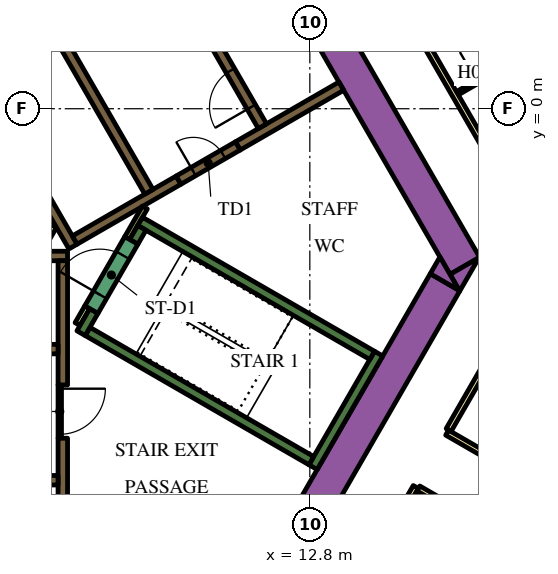
"""IFC4 building model, lengths in metres.
Left out: names, types, materials, properties, quantities, classifications, styles, units other than length and angle.
Written with IfcOpenShell. Run it as: python <this file> out.ifc"""

import sys

from ifc_helpers import new_model, si_unit, direction, frame, frame_2d, origin, place, context, subcontext, project, spatial, polyline, rectangle, outline, extrude, element, fill, save


model = new_model("IFC4")
c1 = context("Model", 3, precision=1e-05, world=origin(), true_north=direction((0.0, 1.0)))
c2 = subcontext(c1, "Body", "Model", "MODEL_VIEW")
j1 = project(units=[si_unit("LENGTHUNIT", "METRE"), si_unit("PLANEANGLEUNIT", "RADIAN")], contexts=[c1])
p1 = place(None, origin())
s1 = spatial("IfcSite", under=j1, at=p1, CompositionType="ELEMENT")
p2 = place(p1, origin())
s2 = spatial("IfcBuilding", under=s1, at=p2, CompositionType="ELEMENT")
p3 = place(p2, frame((0.0, 0.0, 103.2)))
s3 = spatial("IfcBuildingStorey", under=s2, at=p3, CompositionType="ELEMENT", Elevation=103.2)
p4 = place(p3, frame((6.711, 13.476, 0.0), z_axis=(0.0, 0.0, 1.0), x_axis=(0.500002723396, -0.866023831425, 0.0)))
e1 = element("IfcWall", 1, at=p4, inside=s3, PredefinedType="SOLIDWALL", context=c2, shape_type="SweptSolid", body=[
    extrude(rectangle(XDim=20.334, YDim=0.9, at=frame_2d((10.167, 0.0))), origin(), (0.0, 0.0, 1.0), 3.9),
])
p5 = place(p3, origin())
e2 = element("IfcWall", 2, at=p5, inside=s3, PredefinedType="SOLIDWALL", context=c2, shape_type="SweptSolid", body=[
    extrude(outline(polyline([(16.743, -4.8), (16.489, -4.36), (17.251, -3.92), (16.743, -4.8)])), origin(), (0.0, 0.0, 1.0), 3.9),
])
p6 = place(p3, frame((11.695, -12.644, 0.0), z_axis=(0.0, 0.0, 1.0), x_axis=(0.500010229568, 0.86601949766, 0.0)))
e3 = element("IfcWall", 3, at=p6, inside=s3, PredefinedType="SOLIDWALL", context=c2, shape_type="SweptSolid", body=[
    extrude(rectangle(XDim=9.326, YDim=0.9, at=frame_2d((4.663, 0.0))), origin(), (0.0, 0.0, 1.0), 3.9),
])
e4 = element("IfcWall", 4, at=p5, inside=s3, PredefinedType="SOLIDWALL", context=c2, shape_type="SweptSolid", body=[
    extrude(outline(polyline([(16.223, -3.9), (16.732, -4.78), (15.969, -4.34), (16.223, -3.9)])), origin(), (0.0, 0.0, 1.0), 3.9),
])
p7 = place(p3, frame((12.885, -9.431, 0.0), z_axis=(0.0, 0.0, 1.0), x_axis=(0.500020560727, 0.866013532718, 0.0)))
e5 = element("IfcWall", 5, at=p7, inside=s3, PredefinedType="SOLIDWALL", context=c2, shape_type="SweptSolid", body=[
    extrude(rectangle(XDim=3.45, YDim=0.25, at=frame_2d((1.725, 0.0))), origin(), (0.0, 0.0, 1.0), 3.9),
])
p8 = place(p3, frame((12.84, -9.261, 0.0), z_axis=(0.0, 0.0, 1.0), x_axis=(-0.866013990052, 0.500019768644, 0.0)))
e6 = element("IfcWall", 6, at=p8, inside=s3, PredefinedType="SOLIDWALL", context=c2, shape_type="SweptSolid", body=[
    extrude(rectangle(XDim=6.8, YDim=0.25, at=frame_2d((3.4, 0.0))), origin(), (0.0, 0.0, 1.0), 3.9),
])
p9 = place(p3, frame((6.78, -5.906, 0.0), z_axis=(0.0, 0.0, 1.0), x_axis=(0.500223362819, 0.865896406789, 0.0)))
e7 = element("IfcWall", 7, at=p9, inside=s3, PredefinedType="SOLIDWALL", context=c2, shape_type="SweptSolid", body=[
    extrude(rectangle(XDim=0.675, YDim=0.25, at=frame_2d((0.337, 0.0))), origin(), (0.0, 0.0, 1.0), 3.9),
])
p10 = place(p3, frame((8.334, -2.964, 0.0), z_axis=(0.0, 0.0, 1.0), x_axis=(0.866016039709, -0.500016218704, 0.0)))
e8 = element("IfcWall", 8, at=p10, inside=s3, PredefinedType="SOLIDWALL", context=c2, shape_type="SweptSolid", body=[
    extrude(rectangle(XDim=7.05, YDim=0.25, at=frame_2d((3.525, 0.0))), origin(), (0.0, 0.0, 1.0), 3.9),
])
p11 = place(p3, frame((8.168, -3.503, 0.0), z_axis=(0.0, 0.0, 1.0), x_axis=(0.49972245349, 0.866185586049, 0.0)))
e9 = element("IfcWall", 9, at=p11, inside=s3, PredefinedType="SOLIDWALL", context=c2, shape_type="SweptSolid", body=[
    extrude(rectangle(XDim=0.425, YDim=0.25, at=frame_2d((0.212, 0.0))), origin(), (0.0, 0.0, 1.0), 3.9),
])
p12 = place(p3, frame((-5.545, -3.875, 0.0), z_axis=(0.0, 0.0, 1.0), x_axis=(1.0, 0.0, 0.0)))
e10 = element("IfcWall", 10, at=p12, inside=s3, PredefinedType="SOLIDWALL", context=c2, shape_type="SweptSolid", body=[
    extrude(rectangle(XDim=11.97, YDim=0.25, at=frame_2d((5.985, 0.0))), origin(), (0.0, 0.0, 1.0), 3.9),
])
p13 = place(p3, frame((6.3, -8.67, 0.0), z_axis=(0.0, 0.0, 1.0), x_axis=(0.0, -1.0, 0.0)))
e11 = element("IfcWall", 11, at=p13, inside=s3, PredefinedType="SOLIDWALL", context=c2, shape_type="SweptSolid", body=[
    extrude(rectangle(XDim=3.43, YDim=0.25, at=frame_2d((1.715, 0.0))), origin(), (0.0, 0.0, 1.0), 3.9),
])
p14 = place(p3, frame((6.3, -7.268, 0.0), z_axis=(0.0, 0.0, 1.0), x_axis=(0.0, 1.0, 0.0)))
e12 = element("IfcWall", 12, at=p14, inside=s3, PredefinedType="SOLIDWALL", context=c2, shape_type="SweptSolid", body=[
    extrude(rectangle(XDim=3.268, YDim=0.25, at=frame_2d((1.634, 0.0))), origin(), (0.0, 0.0, 1.0), 3.9),
])
p15 = place(p3, frame((13.629, 0.594, 0.0), z_axis=(0.0, 0.0, 1.0), x_axis=(-0.86602790099, -0.499995674689, 0.0)))
e13 = element("IfcWall", 13, at=p15, inside=s3, PredefinedType="SOLIDWALL", context=c2, shape_type="SweptSolid", body=[
    extrude(rectangle(XDim=3.146, YDim=0.25, at=frame_2d((1.573, 0.0))), origin(), (0.0, 0.0, 1.0), 3.9),
])
e14 = element("IfcWall", 14, at=p5, inside=s3, PredefinedType="SOLIDWALL", context=c2, shape_type="SweptSolid", body=[
    extrude(outline(polyline([(0.566, 6.725), (0.566, 6.875), (0.566, 6.875), (0.565, 6.875), (0.361, 6.875), (0.035, 7.439), (0.252, 7.564), (0.377, 7.348), (6.552, -3.348), (6.677, -3.564), (6.46, -3.689), (0.448, 6.725), (0.565, 6.725), (0.566, 6.725), (0.566, 6.725)])), origin(), (0.0, 0.0, 1.0), 3.9),
])
p16 = place(p3, frame((6.614, -3.456, 0.0), z_axis=(0.0, 0.0, 1.0), x_axis=(0.86602447079, 0.500001615989, 0.0)))
e15 = element("IfcWall", 15, at=p16, inside=s3, PredefinedType="SOLIDWALL", context=c2, shape_type="SweptSolid", body=[
    extrude(rectangle(XDim=3.154, YDim=0.25, at=frame_2d((1.577, 0.0))), origin(), (0.0, 0.0, 1.0), 3.9),
])
p17 = place(p3, frame((6.945, -5.222, 0.0), z_axis=(0.0, 0.0, 1.0), x_axis=(-0.499818422106, -0.866130212453, 0.0)))
e16 = element("IfcWall", 16, at=p17, inside=s3, PredefinedType="PARTITIONING", context=c2, shape_type="SweptSolid", body=[
    extrude(rectangle(XDim=0.514, YDim=0.15, at=frame_2d((0.257, 0.0))), origin(), (0.0, 0.0, 1.0), 2.75),
])
p18 = place(p3, frame((5.705, -3.718, 0.0), z_axis=(0.0, 0.0, 1.0), x_axis=(0.499962090823, 0.866047289552, 0.0)))
e17 = element("IfcWall", 17, at=p18, inside=s3, PredefinedType="PARTITIONING", context=c2, shape_type="SweptSolid", body=[
    extrude(rectangle(XDim=0.735, YDim=0.15, at=frame_2d((0.367, 0.0))), origin(), (0.0, 0.0, 1.0), 2.75),
])
p19 = place(p3, frame((8.459, -2.599, 0.0), z_axis=(0.0, 0.0, 1.0), x_axis=(-0.500041054325, -0.866001699761, 0.0)))
e18 = element("IfcWall", 18, at=p19, inside=s3, PredefinedType="PARTITIONING", context=c2, shape_type="SweptSolid", body=[
    extrude(rectangle(XDim=0.929, YDim=0.15, at=frame_2d((0.464, 0.0))), origin(), (0.0, 0.0, 1.0), 3.9),
])
p20 = place(p3, frame((-6.175, -9.775, 0.0), z_axis=(0.0, 0.0, 1.0), x_axis=(1.0, 0.0, 0.0)))
e19 = element("IfcWall", 19, at=p20, inside=s3, PredefinedType="SOLIDWALL", context=c2, shape_type="SweptSolid", body=[
    extrude(rectangle(XDim=12.35, YDim=0.25, at=frame_2d((6.175, 0.0))), origin(), (0.0, 0.0, 1.0), 3.9),
])
p21 = place(p20, frame((0.585, 0.0, 0.0)))
e20 = element("IfcOpeningElement", 20, at=p21, cuts=e19, PredefinedType="OPENING", context=c2, shape_type="SweptSolid", body=[
    extrude(rectangle(XDim=1.1, YDim=2.1, at=frame_2d((0.55, 1.05))), frame((0.0, 0.135, 0.0), z_axis=(0.0, -1.0, 0.0), x_axis=(1.0, 0.0, 0.0)), (0.0, 0.0, 1.0), 0.27),
])
p22 = place(p20, frame((3.105, 0.0, 0.0)))
e21 = element("IfcOpeningElement", 21, at=p22, cuts=e19, PredefinedType="OPENING", context=c2, shape_type="SweptSolid", body=[
    extrude(rectangle(XDim=1.1, YDim=2.1, at=frame_2d((0.55, 1.05))), frame((0.0, 0.135, 0.0), z_axis=(0.0, -1.0, 0.0), x_axis=(1.0, 0.0, 0.0)), (0.0, 0.0, 1.0), 0.27),
])
p23 = place(p20, frame((5.625, 0.0, 0.0)))
e22 = element("IfcOpeningElement", 22, at=p23, cuts=e19, PredefinedType="OPENING", context=c2, shape_type="SweptSolid", body=[
    extrude(rectangle(XDim=1.1, YDim=2.1, at=frame_2d((0.55, 1.05))), frame((0.0, 0.135, 0.0), z_axis=(0.0, -1.0, 0.0), x_axis=(1.0, 0.0, 0.0)), (0.0, 0.0, 1.0), 0.27),
])
p24 = place(p20, frame((8.145, 0.0, 0.0)))
e23 = element("IfcOpeningElement", 23, at=p24, cuts=e19, PredefinedType="OPENING", context=c2, shape_type="SweptSolid", body=[
    extrude(rectangle(XDim=1.1, YDim=2.1, at=frame_2d((0.55, 1.05))), frame((0.0, 0.135, 0.0), z_axis=(0.0, -1.0, 0.0), x_axis=(1.0, 0.0, 0.0)), (0.0, 0.0, 1.0), 0.27),
])
p25 = place(p20, frame((10.665, 0.0, 0.0)))
e24 = element("IfcOpeningElement", 24, at=p25, cuts=e19, PredefinedType="OPENING", context=c2, shape_type="SweptSolid", body=[
    extrude(rectangle(XDim=1.1, YDim=2.1, at=frame_2d((0.55, 1.05))), frame((0.0, 0.135, 0.0), z_axis=(0.0, -1.0, 0.0), x_axis=(1.0, 0.0, 0.0)), (0.0, 0.0, 1.0), 0.27),
])
p26 = place(p3, frame((-6.175, -6.325, 0.0), z_axis=(0.0, 0.0, 1.0), x_axis=(1.0, 0.0, 0.0)))
e25 = element("IfcWall", 25, at=p26, inside=s3, PredefinedType="SOLIDWALL", context=c2, shape_type="SweptSolid", body=[
    extrude(rectangle(XDim=12.35, YDim=0.25, at=frame_2d((6.175, 0.0))), origin(), (0.0, 0.0, 1.0), 3.9),
])
p27 = place(p26, frame((3.205, 0.0, 0.0)))
e26 = element("IfcOpeningElement", 26, at=p27, cuts=e25, PredefinedType="OPENING", context=c2, shape_type="SweptSolid", body=[
    extrude(rectangle(XDim=0.9, YDim=2.1, at=frame_2d((0.45, 1.05))), frame((0.0, 0.135, 0.0), z_axis=(0.0, -1.0, 0.0), x_axis=(1.0, 0.0, 0.0)), (0.0, 0.0, 1.0), 0.27),
])
p28 = place(p26, frame((8.145, 0.0, 0.0)))
e27 = element("IfcOpeningElement", 27, at=p28, cuts=e25, PredefinedType="OPENING", context=c2, shape_type="SweptSolid", body=[
    extrude(rectangle(XDim=1.1, YDim=2.1, at=frame_2d((0.55, 1.05))), frame((0.0, 0.135, 0.0), z_axis=(0.0, -1.0, 0.0), x_axis=(1.0, 0.0, 0.0)), (0.0, 0.0, 1.0), 0.27),
])
p29 = place(p26, frame((10.665, 0.0, 0.0)))
e28 = element("IfcOpeningElement", 28, at=p29, cuts=e25, PredefinedType="OPENING", context=c2, shape_type="SweptSolid", body=[
    extrude(rectangle(XDim=1.1, YDim=2.1, at=frame_2d((0.55, 1.05))), frame((0.0, 0.135, 0.0), z_axis=(0.0, -1.0, 0.0), x_axis=(1.0, 0.0, 0.0)), (0.0, 0.0, 1.0), 0.27),
])
p30 = place(p3, frame((11.553, -0.46, 0.0), z_axis=(0.0, 0.0, 1.0), x_axis=(-0.500006514828, 0.866021642414, 0.0)))
e29 = element("IfcWall", 29, at=p30, inside=s3, PredefinedType="SOLIDWALL", context=c2, shape_type="SweptSolid", body=[
    extrude(rectangle(XDim=12.35, YDim=0.25, at=frame_2d((6.175, 0.0))), origin(), (0.0, 0.0, 1.0), 3.9),
])
p31 = place(p30, frame((0.585, 0.0, 0.0)))
e30 = element("IfcOpeningElement", 30, at=p31, cuts=e29, PredefinedType="OPENING", context=c2, shape_type="SweptSolid", body=[
    extrude(rectangle(XDim=1.1, YDim=2.1, at=frame_2d((0.55, 1.05))), frame((0.0, 0.135, 0.0), z_axis=(0.0, -1.0, 0.0), x_axis=(1.0, 0.0, 0.0)), (0.0, 0.0, 1.0), 0.27),
])
p32 = place(p30, frame((3.105, 0.0, 0.0)))
e31 = element("IfcOpeningElement", 31, at=p32, cuts=e29, PredefinedType="OPENING", context=c2, shape_type="SweptSolid", body=[
    extrude(rectangle(XDim=1.1, YDim=2.1, at=frame_2d((0.55, 1.05))), frame((0.0, 0.135, 0.0), z_axis=(0.0, -1.0, 0.0), x_axis=(1.0, 0.0, 0.0)), (0.0, 0.0, 1.0), 0.27),
])
p33 = place(p30, frame((5.625, 0.0, 0.0)))
e32 = element("IfcOpeningElement", 32, at=p33, cuts=e29, PredefinedType="OPENING", context=c2, shape_type="SweptSolid", body=[
    extrude(rectangle(XDim=1.1, YDim=2.1, at=frame_2d((0.55, 1.05))), frame((0.0, 0.135, 0.0), z_axis=(0.0, -1.0, 0.0), x_axis=(1.0, 0.0, 0.0)), (0.0, 0.0, 1.0), 0.27),
])
p34 = place(p3, frame((8.565, -2.185, 0.0), z_axis=(0.0, 0.0, 1.0), x_axis=(-0.499997954832, 0.866026584559, 0.0)))
e33 = element("IfcWall", 33, at=p34, inside=s3, PredefinedType="SOLIDWALL", context=c2, shape_type="SweptSolid", body=[
    extrude(rectangle(XDim=12.35, YDim=0.25, at=frame_2d((6.175, 0.0))), origin(), (0.0, 0.0, 1.0), 3.9),
])
p35 = place(p34, frame((5.725, 0.0, 0.0)))
e34 = element("IfcOpeningElement", 34, at=p35, cuts=e33, PredefinedType="OPENING", context=c2, shape_type="SweptSolid", body=[
    extrude(rectangle(XDim=0.9, YDim=2.1, at=frame_2d((0.45, 1.05))), frame((0.0, 0.135, 0.0), z_axis=(0.0, -1.0, 0.0), x_axis=(1.0, 0.0, 0.0)), (0.0, 0.0, 1.0), 0.27),
])
p36 = place(p3, frame((7.053, -5.284, 0.0), z_axis=(0.0, 0.0, 1.0), x_axis=(0.500078061341, 0.865980330357, 0.0)))
e35 = element("IfcWall", 35, at=p36, inside=s3, PredefinedType="SOLIDWALL", context=c2, shape_type="SweptSolid", body=[
    extrude(rectangle(XDim=2.1, YDim=0.4, at=frame_2d((1.05, 0.0))), origin(), (0.0, 0.0, 1.0), 3.9),
])
p37 = place(p36, frame((0.45, 0.0, 0.0)))
e36 = element("IfcOpeningElement", 36, at=p37, cuts=e35, PredefinedType="OPENING", context=c2, shape_type="SweptSolid", body=[
    extrude(rectangle(XDim=1.2, YDim=2.1, at=frame_2d((0.6, 1.05))), frame((0.0, 0.21, 0.0), z_axis=(0.0, -1.0, 0.0), x_axis=(1.0, 0.0, 0.0)), (0.0, 0.0, 1.0), 0.42),
])
p38 = place(p3, frame((9.346, -1.879, 0.0), z_axis=(0.0, 0.0, 1.0), x_axis=(0.866047807691, 0.499961193289, 0.0)))
e37 = element("IfcWall", 37, at=p38, inside=s3, PredefinedType="SOLIDWALL", context=c2, shape_type="SweptSolid", body=[
    extrude(rectangle(XDim=1.8, YDim=0.25, at=frame_2d((0.9, 0.0))), origin(), (0.0, 0.0, 1.0), 3.9),
])
p39 = place(p38, frame((0.45, 0.0, 0.0)))
e38 = element("IfcOpeningElement", 38, at=p39, cuts=e37, PredefinedType="OPENING", context=c2, shape_type="SweptSolid", body=[
    extrude(rectangle(XDim=0.9, YDim=2.1, at=frame_2d((0.45, 1.05))), frame((0.0, 0.135, 0.0), z_axis=(0.0, -1.0, 0.0), x_axis=(1.0, 0.0, 0.0)), (0.0, 0.0, 1.0), 0.27),
])
p40 = place(p3, frame((6.22, -7.266, 0.0), z_axis=(0.0, 0.0, 1.0), x_axis=(0.0, -1.0, 0.0)))
e39 = element("IfcWall", 39, at=p40, inside=s3, PredefinedType="PARTITIONING", context=c2, shape_type="SweptSolid", body=[
    extrude(rectangle(XDim=1.4, YDim=0.09, at=frame_2d((0.7, 0.0))), origin(), (0.0, 0.0, 1.0), 2.75),
])
p41 = place(p40, frame((0.1, 0.0, 0.0)))
e40 = element("IfcOpeningElement", 40, at=p41, cuts=e39, PredefinedType="OPENING", context=c2, shape_type="SweptSolid", body=[
    extrude(rectangle(XDim=1.2, YDim=2.1, at=frame_2d((0.6, 1.05))), frame((0.0, 0.055, 0.0), z_axis=(0.0, -1.0, 0.0), x_axis=(1.0, 0.0, 0.0)), (0.0, 0.0, 1.0), 0.11),
])
p42 = place(p3, frame((16.412, -8.523, 0.0), z_axis=(0.0, 0.0, 1.0), x_axis=(0.866025629663, -0.499999608766, 0.0)))
e41 = element("IfcWall", 41, at=p42, inside=s3, PredefinedType="PARTITIONING", context=c2, shape_type="SweptSolid", body=[
    extrude(rectangle(XDim=13.624, YDim=0.15, at=frame_2d((6.812, 0.0))), origin(), (0.0, 0.0, 1.0), 2.75),
])
p43 = place(p42, frame((4.134, 0.0, 0.0)))
e42 = element("IfcOpeningElement", 42, at=p43, cuts=e41, PredefinedType="OPENING", context=c2, shape_type="SweptSolid", body=[
    extrude(rectangle(XDim=1.0, YDim=2.1, at=frame_2d((0.5, 1.05))), frame((0.0, 0.085, 0.0), z_axis=(0.0, -1.0, 0.0), x_axis=(1.0, 0.0, 0.0)), (0.0, 0.0, 1.0), 0.17),
])
p44 = place(p3, frame((19.081, -3.9, 0.0), z_axis=(0.0, 0.0, 1.0), x_axis=(-0.499974327079, -0.866040225545, 0.0)))
e43 = element("IfcWall", 43, at=p44, inside=s3, PredefinedType="PARTITIONING", context=c2, shape_type="SweptSolid", body=[
    extrude(rectangle(XDim=5.258, YDim=0.15, at=frame_2d((2.629, 0.0))), origin(), (0.0, 0.0, 1.0), 2.75),
])
p45 = place(p44, frame((0.18, 0.0, 0.0)))
e44 = element("IfcOpeningElement", 44, at=p45, cuts=e43, PredefinedType="OPENING", context=c2, shape_type="SweptSolid", body=[
    extrude(rectangle(XDim=1.0, YDim=2.1, at=frame_2d((0.5, 1.05))), frame((0.0, 0.085, 0.0), z_axis=(0.0, -1.0, 0.0), x_axis=(1.0, 0.0, 0.0)), (0.0, 0.0, 1.0), 0.17),
])
p46 = place(p3, frame((6.163, 18.475, 0.0), z_axis=(0.0, 0.0, 1.0), x_axis=(0.500001317485, -0.866024643133, 0.0)))
e45 = element("IfcWall", 45, at=p46, inside=s3, PredefinedType="PARTITIONING", context=c2, shape_type="SweptSolid", body=[
    extrude(rectangle(XDim=25.767, YDim=0.15, at=frame_2d((12.883, 0.0))), origin(), (0.0, 0.0, 1.0), 2.75),
])
p47 = place(p46, frame((24.241, 0.0, 0.0)))
e46 = element("IfcOpeningElement", 46, at=p47, cuts=e45, PredefinedType="OPENING", context=c2, shape_type="SweptSolid", body=[
    extrude(rectangle(XDim=1.0, YDim=2.1, at=frame_2d((0.5, 1.05))), frame((0.0, 0.085, 0.0), z_axis=(0.0, -1.0, 0.0), x_axis=(1.0, 0.0, 0.0)), (0.0, 0.0, 1.0), 0.17),
])
p48 = place(p46, frame((13.144, 0.0, 0.0)))
e47 = element("IfcOpeningElement", 47, at=p48, cuts=e45, PredefinedType="OPENING", context=c2, shape_type="SweptSolid", body=[
    extrude(rectangle(XDim=1.0, YDim=2.1, at=frame_2d((0.5, 1.05))), frame((0.0, 0.085, 0.0), z_axis=(0.0, -1.0, 0.0), x_axis=(1.0, 0.0, 0.0)), (0.0, 0.0, 1.0), 0.17),
])
p49 = place(p46, frame((11.592, 0.0, 0.0)))
e48 = element("IfcOpeningElement", 48, at=p49, cuts=e45, PredefinedType="OPENING", context=c2, shape_type="SweptSolid", body=[
    extrude(rectangle(XDim=1.1, YDim=2.1, at=frame_2d((0.55, 1.05))), frame((0.0, 0.085, 0.0), z_axis=(0.0, -1.0, 0.0), x_axis=(1.0, 0.0, 0.0)), (0.0, 0.0, 1.0), 0.17),
])
p50 = place(p46, frame((4.674, 0.0, 0.0)))
e49 = element("IfcOpeningElement", 49, at=p50, cuts=e45, PredefinedType="OPENING", context=c2, shape_type="SweptSolid", body=[
    extrude(rectangle(XDim=0.9, YDim=2.1, at=frame_2d((0.45, 1.05))), frame((0.0, 0.085, 0.0), z_axis=(0.0, -1.0, 0.0), x_axis=(1.0, 0.0, 0.0)), (0.0, 0.0, 1.0), 0.17),
])
p51 = place(p46, frame((2.411, 0.0, 0.0)))
e50 = element("IfcOpeningElement", 50, at=p51, cuts=e45, PredefinedType="OPENING", context=c2, shape_type="SweptSolid", body=[
    extrude(rectangle(XDim=1.0, YDim=2.1, at=frame_2d((0.5, 1.05))), frame((0.0, 0.085, 0.0), z_axis=(0.0, -1.0, 0.0), x_axis=(1.0, 0.0, 0.0)), (0.0, 0.0, 1.0), 0.17),
])
p52 = place(p3, frame((15.587, -9.952, 0.0), z_axis=(0.0, 0.0, 1.0), x_axis=(-0.500016618951, -0.866015808616, 0.0)))
e51 = element("IfcWall", 51, at=p52, inside=s3, PredefinedType="PARTITIONING", context=c2, shape_type="SweptSolid", body=[
    extrude(rectangle(XDim=5.268, YDim=0.15, at=frame_2d((2.634, 0.0))), origin(), (0.0, 0.0, 1.0), 2.75),
])
p53 = place(p52, frame((4.088, 0.0, 0.0)))
e52 = element("IfcOpeningElement", 52, at=p53, cuts=e51, PredefinedType="OPENING", context=c2, shape_type="SweptSolid", body=[
    extrude(rectangle(XDim=1.0, YDim=2.1, at=frame_2d((0.5, 1.05))), frame((0.0, 0.085, 0.0), z_axis=(0.0, -1.0, 0.0), x_axis=(1.0, 0.0, 0.0)), (0.0, 0.0, 1.0), 0.17),
])
p54 = place(p3, frame((27.386, -16.764, 0.0), z_axis=(0.0, 0.0, 1.0), x_axis=(-0.866022585856, 0.500004880763, 0.0)))
e53 = element("IfcWall", 53, at=p54, inside=s3, PredefinedType="PARTITIONING", context=c2, shape_type="SweptSolid", body=[
    extrude(rectangle(XDim=13.544, YDim=0.15, at=frame_2d((6.772, 0.0))), origin(), (0.0, 0.0, 1.0), 2.75),
])
p55 = place(p54, frame((8.491, 0.0, 0.0)))
e54 = element("IfcOpeningElement", 54, at=p55, cuts=e53, PredefinedType="OPENING", context=c2, shape_type="SweptSolid", body=[
    extrude(rectangle(XDim=1.0, YDim=2.1, at=frame_2d((0.5, 1.05))), frame((0.0, 0.085, 0.0), z_axis=(0.0, -1.0, 0.0), x_axis=(1.0, 0.0, 0.0)), (0.0, 0.0, 1.0), 0.17),
])
p56 = place(p3, frame((16.681, 0.407, 0.0), z_axis=(0.0, 0.0, 1.0), x_axis=(0.866021400173, 0.500006934395, 0.0)))
e55 = element("IfcWall", 55, at=p56, inside=s3, PredefinedType="PARTITIONING", context=c2, shape_type="SweptSolid", body=[
    extrude(rectangle(XDim=2.6, YDim=0.1, at=frame_2d((1.3, 0.0))), origin(), (0.0, 0.0, 1.0), 2.75),
])
p57 = place(p56, frame((0.6, 0.0, 0.0)))
e56 = element("IfcOpeningElement", 56, at=p57, cuts=e55, PredefinedType="OPENING", context=c2, shape_type="SweptSolid", body=[
    extrude(rectangle(XDim=0.9, YDim=2.1, at=frame_2d((0.45, 1.05))), frame((0.0, 0.06, 0.0), z_axis=(0.0, -1.0, 0.0), x_axis=(1.0, 0.0, 0.0)), (0.0, 0.0, 1.0), 0.12),
])
p58 = place(p31, origin())
e57 = element("IfcDoor", 57, at=p58, inside=s3, OperationType="DOUBLE_DOOR_SLIDING", PredefinedType="DOOR", context=c2, shape_type="SweptSolid", body=[
    extrude(rectangle(XDim=1.1, YDim=2.1, at=frame_2d((0.55, 1.05))), frame((0.0, 0.025, 0.0), z_axis=(0.0, -1.0, 0.0), x_axis=(1.0, 0.0, 0.0)), (0.0, 0.0, 1.0), 0.05),
])
fill(e30, e57)
p59 = place(p37, origin())
e58 = element("IfcDoor", 58, at=p59, inside=s3, OperationType="SINGLE_SWING_LEFT", PredefinedType="DOOR", context=c2, shape_type="SweptSolid", body=[
    extrude(rectangle(XDim=1.2, YDim=2.1, at=frame_2d((0.6, 1.05))), frame((0.0, 0.025, 0.0), z_axis=(0.0, -1.0, 0.0), x_axis=(1.0, 0.0, 0.0)), (0.0, 0.0, 1.0), 0.05),
])
fill(e36, e58)
p60 = place(p39, origin())
e59 = element("IfcDoor", 59, at=p60, inside=s3, OperationType="SINGLE_SWING_LEFT", PredefinedType="DOOR", context=c2, shape_type="SweptSolid", body=[
    extrude(rectangle(XDim=0.9, YDim=2.1, at=frame_2d((0.45, 1.05))), frame((0.0, 0.025, 0.0), z_axis=(0.0, -1.0, 0.0), x_axis=(1.0, 0.0, 0.0)), (0.0, 0.0, 1.0), 0.05),
])
fill(e38, e59)
p61 = place(p41, origin())
e60 = element("IfcDoor", 60, at=p61, inside=s3, OperationType="SINGLE_SWING_LEFT", PredefinedType="DOOR", context=c2, shape_type="SweptSolid", body=[
    extrude(rectangle(XDim=1.2, YDim=2.1, at=frame_2d((0.6, 1.05))), frame((0.0, 0.025, 0.0), z_axis=(0.0, -1.0, 0.0), x_axis=(1.0, 0.0, 0.0)), (0.0, 0.0, 1.0), 0.05),
])
fill(e40, e60)
p62 = place(p57, origin())
e61 = element("IfcDoor", 61, at=p62, inside=s3, OperationType="SINGLE_SWING_LEFT", PredefinedType="DOOR", context=c2, shape_type="SweptSolid", body=[
    extrude(rectangle(XDim=0.9, YDim=2.1, at=frame_2d((0.45, 1.05))), frame((0.0, 0.025, 0.0), z_axis=(0.0, -1.0, 0.0), x_axis=(1.0, 0.0, 0.0)), (0.0, 0.0, 1.0), 0.05),
])
fill(e56, e61)
save(model, sys.argv[1])
